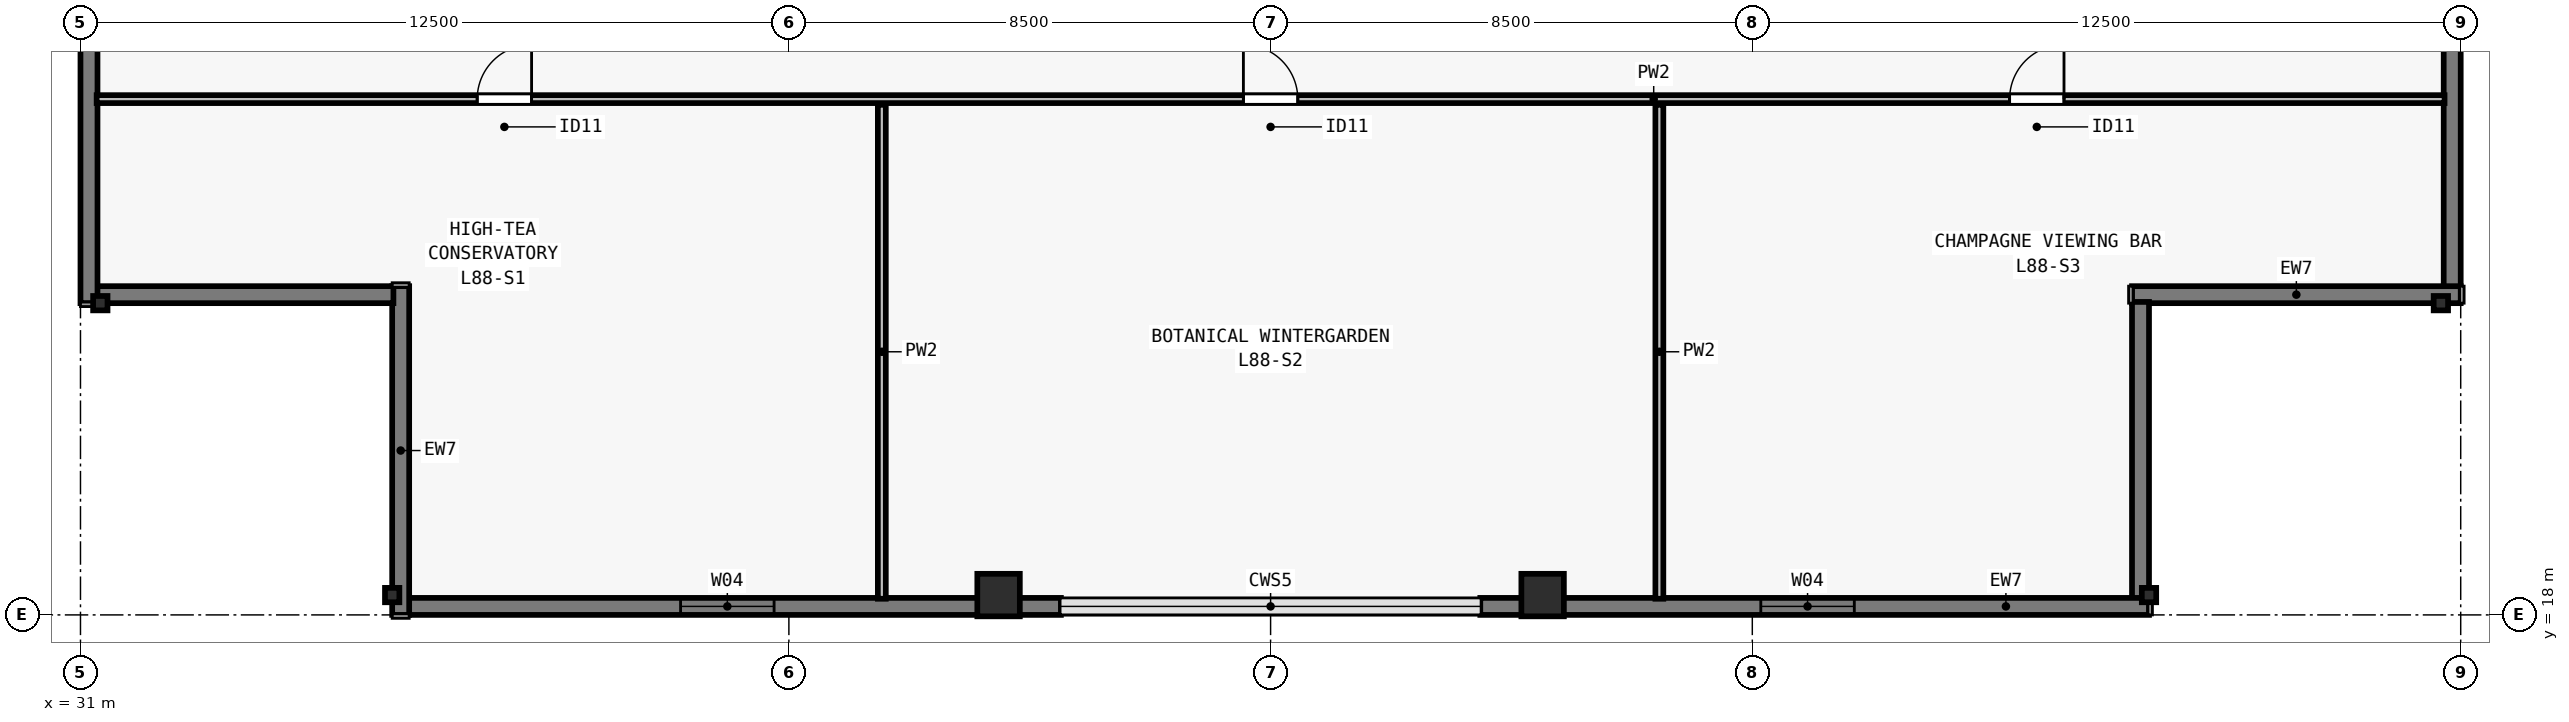
"""IFC4 building model, lengths in metres.
Left out: names, types, materials, properties, quantities, classifications, styles, units other than length and angle.
Written with IfcOpenShell. Run it as: python <this file> out.ifc"""

import sys

from ifc_helpers import new_model, si_unit, direction, frame, frame_2d, origin, origin_2d, place, context, subcontext, project, spatial, rectangle, i_section, extrude, element, fill, save


model = new_model("IFC4")
c1 = context("Model", 3, precision=1e-05, world=origin(), true_north=direction((0.0, 1.0)))
c2 = subcontext(c1, "Body", "Model", "MODEL_VIEW")
j1 = project(units=[si_unit("LENGTHUNIT", "METRE"), si_unit("PLANEANGLEUNIT", "RADIAN")], contexts=[c1])
p1 = place(None, origin())
s1 = spatial("IfcSite", under=j1, at=p1, CompositionType="ELEMENT")
p2 = place(p1, origin())
s2 = spatial("IfcBuilding", under=s1, at=p2, CompositionType="ELEMENT")
p3 = place(p2, frame((0.0, 0.0, 320.0)))
s3 = spatial("IfcBuildingStorey", under=s2, at=p3, CompositionType="ELEMENT", Elevation=320.0)
p4 = place(p3, frame((36.5, 18.35, 0.0), z_axis=(0.0, 0.0, 1.0), x_axis=(1.0, 0.0, 0.0)))
e1 = element("IfcColumn", 1, at=p4, inside=s3, PredefinedType="COLUMN", context=c2, shape_type="SweptSolid", body=[
    extrude(i_section(OverallWidth=0.254, OverallDepth=0.254, WebThickness=0.009, FlangeThickness=0.014, FilletRadius=0.013, at=origin_2d()), origin(), (0.0, 0.0, 1.0), 4.5),
])
for number, where, z_axis, x_axis in (
    (2, (47.2, 18.35, 0.0), (0.0, 0.0, 1.0), (1.0, 0.0, 0.0)),
    (3, (56.8, 18.35, 0.0), (0.0, 0.0, 1.0), (1.0, 0.0, 0.0)),
):
    element("IfcColumn", number, at=place(p3, frame(where, z_axis=z_axis, x_axis=x_axis)), inside=s3, PredefinedType="COLUMN", context=c2, shape_type="SweptSolid", body=[
        extrude(rectangle(XDim=0.75, YDim=0.75, at=origin_2d()), origin(), (0.0, 0.0, 1.0), 4.5),
    ])
for number, where, z_axis, x_axis in (
    (4, (67.5, 18.35, 0.0), (0.0, 0.0, 1.0), (1.0, 0.0, 0.0)),
    (5, (72.65, 23.5, 0.0), (0.0, 0.0, 1.0), (0.0, 1.0, 0.0)),
    (6, (31.35, 23.5, 0.0), (0.0, 0.0, 1.0), (0.0, 1.0, 0.0)),
):
    element("IfcColumn", number, at=place(p3, frame(where, z_axis=z_axis, x_axis=x_axis)), inside=s3, PredefinedType="COLUMN", context=c2, shape_type="SweptSolid", body=[
        extrude(i_section(OverallWidth=0.254, OverallDepth=0.254, WebThickness=0.009, FlangeThickness=0.014, FilletRadius=0.013, at=origin_2d()), origin(), (0.0, 0.0, 1.0), 4.5),
    ])
p5 = place(p3, frame((72.85, 35.3, 0.0), z_axis=(0.0, 0.0, 1.0), x_axis=(0.0, -1.0, 0.0)))
e7 = element("IfcWall", 7, at=p5, inside=s3, PredefinedType="SOLIDWALL", context=c2, shape_type="SweptSolid", body=[
    extrude(rectangle(XDim=11.522, YDim=0.3, at=frame_2d((5.761, 0.0))), origin(), (0.0, 0.0, 1.0), 4.25),
])
p6 = place(p3, frame((73.0, 23.65, 0.0), z_axis=(0.0, 0.0, 1.0), x_axis=(-1.0, 0.0, 0.0)))
e8 = element("IfcWall", 8, at=p6, inside=s3, PredefinedType="SOLIDWALL", context=c2, shape_type="SweptSolid", body=[
    extrude(rectangle(XDim=5.8, YDim=0.3, at=frame_2d((2.9, 0.0))), origin(), (0.0, 0.0, 1.0), 4.25),
])
p7 = place(p3, frame((67.35, 23.522, 0.0), z_axis=(0.0, 0.0, 1.0), x_axis=(0.0, -1.0, 0.0)))
e9 = element("IfcWall", 9, at=p7, inside=s3, PredefinedType="SOLIDWALL", context=c2, shape_type="SweptSolid", body=[
    extrude(rectangle(XDim=5.244, YDim=0.3, at=frame_2d((2.622, 0.0))), origin(), (0.0, 0.0, 1.0), 4.25),
])
p8 = place(p3, frame((67.5, 18.15, 0.0), z_axis=(0.0, 0.0, 1.0), x_axis=(-1.0, 0.0, 0.0)))
e10 = element("IfcWall", 10, at=p8, inside=s3, PredefinedType="SOLIDWALL", context=c2, shape_type="SweptSolid", body=[
    extrude(rectangle(XDim=11.8, YDim=0.3, at=frame_2d((5.9, 0.0))), origin(), (0.0, 0.0, 1.0), 4.25),
])
p9 = place(p8, frame((5.2, 0.0, 0.8)))
e11 = element("IfcOpeningElement", 11, at=p9, cuts=e10, PredefinedType="OPENING", context=c2, shape_type="SweptSolid", body=[
    extrude(rectangle(XDim=1.65, YDim=1.53, at=frame_2d((0.825, 0.765))), frame((0.0, 0.16, 0.0), z_axis=(0.0, -1.0, 0.0), x_axis=(1.0, 0.0, 0.0)), (0.0, 0.0, 1.0), 0.32),
])
p10 = place(p3, frame((48.3, 18.15, 0.0), z_axis=(0.0, 0.0, 1.0), x_axis=(-1.0, 0.0, 0.0)))
e12 = element("IfcWall", 12, at=p10, inside=s3, PredefinedType="SOLIDWALL", context=c2, shape_type="SweptSolid", body=[
    extrude(rectangle(XDim=11.522, YDim=0.3, at=frame_2d((5.761, 0.0))), origin(), (0.0, 0.0, 1.0), 4.25),
])
p11 = place(p10, frame((5.061, 0.0, 0.8)))
e13 = element("IfcOpeningElement", 13, at=p11, cuts=e12, PredefinedType="OPENING", context=c2, shape_type="SweptSolid", body=[
    extrude(rectangle(XDim=1.65, YDim=1.53, at=frame_2d((0.825, 0.765))), frame((0.0, 0.16, 0.0), z_axis=(0.0, -1.0, 0.0), x_axis=(1.0, 0.0, 0.0)), (0.0, 0.0, 1.0), 0.32),
])
p12 = place(p3, frame((36.65, 18.0, 0.0), z_axis=(0.0, 0.0, 1.0), x_axis=(0.0, 1.0, 0.0)))
e14 = element("IfcWall", 14, at=p12, inside=s3, PredefinedType="SOLIDWALL", context=c2, shape_type="SweptSolid", body=[
    extrude(rectangle(XDim=5.8, YDim=0.3, at=frame_2d((2.9, 0.0))), origin(), (0.0, 0.0, 1.0), 4.25),
])
p13 = place(p3, frame((36.522, 23.65, 0.0), z_axis=(0.0, 0.0, 1.0), x_axis=(-1.0, 0.0, 0.0)))
e15 = element("IfcWall", 15, at=p13, inside=s3, PredefinedType="SOLIDWALL", context=c2, shape_type="SweptSolid", body=[
    extrude(rectangle(XDim=5.244, YDim=0.3, at=frame_2d((2.622, 0.0))), origin(), (0.0, 0.0, 1.0), 4.25),
])
p14 = place(p3, frame((31.15, 23.5, 0.0), z_axis=(0.0, 0.0, 1.0), x_axis=(0.0, 1.0, 0.0)))
e16 = element("IfcWall", 16, at=p14, inside=s3, PredefinedType="SOLIDWALL", context=c2, shape_type="SweptSolid", body=[
    extrude(rectangle(XDim=11.8, YDim=0.3, at=frame_2d((5.9, 0.0))), origin(), (0.0, 0.0, 1.0), 4.25),
])
p15 = place(p3, frame((31.285, 27.1, 0.0), z_axis=(0.0, 0.0, 1.0), x_axis=(1.0, 0.0, 0.0)))
e17 = element("IfcWall", 17, at=p15, inside=s3, PredefinedType="PARTITIONING", context=c2, shape_type="SweptSolid", body=[
    extrude(rectangle(XDim=41.43, YDim=0.14, at=frame_2d((20.715, 0.0))), origin(), (0.0, 0.0, 1.0), 3.969),
])
p16 = place(p15, frame((6.715, 0.0, 0.0)))
e18 = element("IfcOpeningElement", 18, at=p16, cuts=e17, PredefinedType="OPENING", context=c2, shape_type="SweptSolid", body=[
    extrude(rectangle(XDim=0.96, YDim=2.12, at=frame_2d((0.48, 1.06))), frame((0.0, 0.08, 0.0), z_axis=(0.0, -1.0, 0.0), x_axis=(1.0, 0.0, 0.0)), (0.0, 0.0, 1.0), 0.16),
])
p17 = place(p15, frame((20.235, 0.0, 0.0)))
e19 = element("IfcOpeningElement", 19, at=p17, cuts=e17, PredefinedType="OPENING", context=c2, shape_type="SweptSolid", body=[
    extrude(rectangle(XDim=0.96, YDim=2.12, at=frame_2d((0.48, 1.06))), frame((0.0, 0.08, 0.0), z_axis=(0.0, -1.0, 0.0), x_axis=(1.0, 0.0, 0.0)), (0.0, 0.0, 1.0), 0.16),
])
p18 = place(p15, frame((33.755, 0.0, 0.0)))
e20 = element("IfcOpeningElement", 20, at=p18, cuts=e17, PredefinedType="OPENING", context=c2, shape_type="SweptSolid", body=[
    extrude(rectangle(XDim=0.96, YDim=2.12, at=frame_2d((0.48, 1.06))), frame((0.0, 0.08, 0.0), z_axis=(0.0, -1.0, 0.0), x_axis=(1.0, 0.0, 0.0)), (0.0, 0.0, 1.0), 0.16),
])
for number, where, z_axis, x_axis in (
    (21, (45.14, 18.285, 0.0), (0.0, 0.0, 1.0), (0.0, 1.0, 0.0)),
    (22, (58.86, 18.285, 0.0), (0.0, 0.0, 1.0), (0.0, 1.0, 0.0)),
):
    element("IfcWall", number, at=place(p3, frame(where, z_axis=z_axis, x_axis=x_axis)), inside=s3, PredefinedType="PARTITIONING", context=c2, shape_type="SweptSolid", body=[
        extrude(rectangle(XDim=8.715, YDim=0.14, at=frame_2d((4.357, 0.0))), origin(), (0.0, 0.0, 1.0), 4.25),
    ])
p19 = place(p9, origin())
e23 = element("IfcWindow", 23, at=p19, inside=s3, PartitioningType="SINGLE_PANEL", PredefinedType="WINDOW", context=c2, shape_type="SweptSolid", body=[
    extrude(rectangle(XDim=1.65, YDim=1.53, at=frame_2d((0.825, 0.765))), frame((0.0, -0.04, 0.0), z_axis=(0.0, -1.0, 0.0), x_axis=(1.0, 0.0, 0.0)), (0.0, 0.0, 1.0), 0.06),
])
fill(e11, e23)
p20 = place(p11, origin())
e24 = element("IfcWindow", 24, at=p20, inside=s3, PartitioningType="SINGLE_PANEL", PredefinedType="WINDOW", context=c2, shape_type="SweptSolid", body=[
    extrude(rectangle(XDim=1.65, YDim=1.53, at=frame_2d((0.825, 0.765))), frame((0.0, -0.04, 0.0), z_axis=(0.0, -1.0, 0.0), x_axis=(1.0, 0.0, 0.0)), (0.0, 0.0, 1.0), 0.06),
])
fill(e13, e24)
p21 = place(p16, origin())
e25 = element("IfcDoor", 25, at=p21, inside=s3, OperationType="SINGLE_SWING_RIGHT", PredefinedType="DOOR", context=c2, shape_type="SweptSolid", body=[
    extrude(rectangle(XDim=0.96, YDim=2.12, at=frame_2d((0.48, 1.06))), frame((0.0, 0.025, 0.0), z_axis=(0.0, -1.0, 0.0), x_axis=(1.0, 0.0, 0.0)), (0.0, 0.0, 1.0), 0.05),
])
fill(e18, e25)
p22 = place(p17, origin())
e26 = element("IfcDoor", 26, at=p22, inside=s3, OperationType="SINGLE_SWING_LEFT", PredefinedType="DOOR", context=c2, shape_type="SweptSolid", body=[
    extrude(rectangle(XDim=0.96, YDim=2.12, at=frame_2d((0.48, 1.06))), frame((0.0, 0.025, 0.0), z_axis=(0.0, -1.0, 0.0), x_axis=(1.0, 0.0, 0.0)), (0.0, 0.0, 1.0), 0.05),
])
fill(e19, e26)
p23 = place(p18, origin())
e27 = element("IfcDoor", 27, at=p23, inside=s3, OperationType="SINGLE_SWING_RIGHT", PredefinedType="DOOR", context=c2, shape_type="SweptSolid", body=[
    extrude(rectangle(XDim=0.96, YDim=2.12, at=frame_2d((0.48, 1.06))), frame((0.0, 0.025, 0.0), z_axis=(0.0, -1.0, 0.0), x_axis=(1.0, 0.0, 0.0)), (0.0, 0.0, 1.0), 0.05),
])
fill(e20, e27)
save(model, sys.argv[1])
